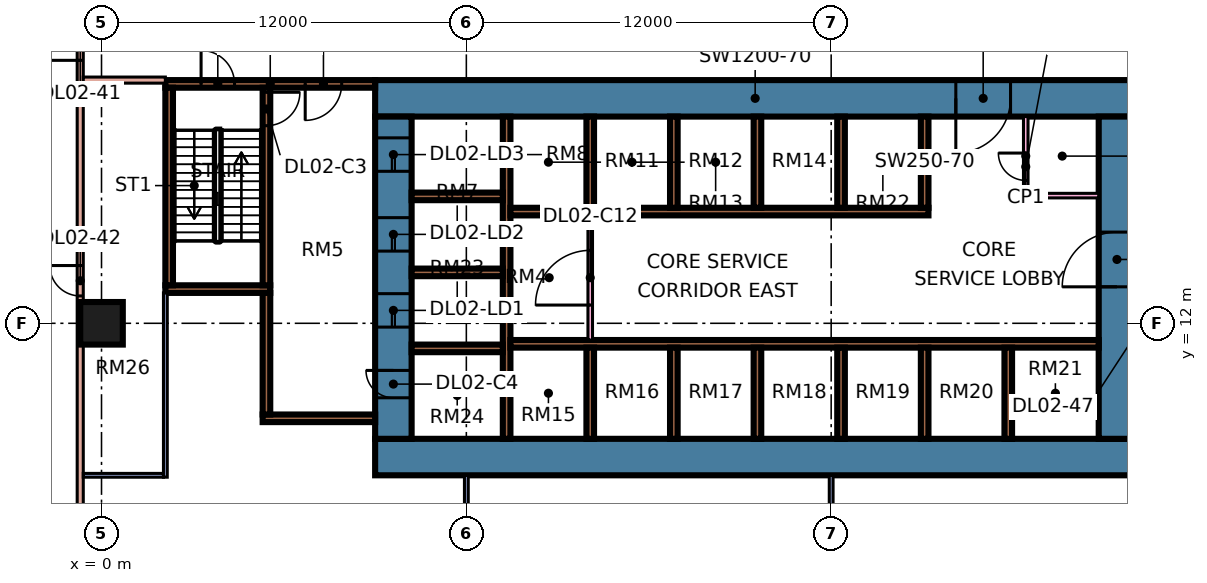
"""IFC4 building model, lengths in metres.
Left out: names, types, materials, properties, quantities, classifications, styles, units other than length and angle.
Written with IfcOpenShell. Run it as: python <this file> out.ifc"""

import sys

from ifc_helpers import new_model, si_unit, direction, frame, frame_2d, origin, origin_2d, place, context, subcontext, project, spatial, rectangle, extrude, element, fill, save


model = new_model("IFC4")
c1 = context("Model", 3, precision=1e-05, world=origin(), true_north=direction((0.0, 1.0)))
c2 = subcontext(c1, "Body", "Model", "MODEL_VIEW")
j1 = project(units=[si_unit("LENGTHUNIT", "METRE"), si_unit("PLANEANGLEUNIT", "RADIAN")], contexts=[c1])
p1 = place(None, origin())
s1 = spatial("IfcSite", under=j1, at=p1, CompositionType="ELEMENT")
p2 = place(p1, origin())
s2 = spatial("IfcBuilding", under=s1, at=p2, CompositionType="ELEMENT")
p3 = place(p2, frame((0.0, 0.0, 12.0)))
s3 = spatial("IfcBuildingStorey", under=s2, at=p3, CompositionType="ELEMENT", Elevation=12.0)
p4 = place(p3, frame((0.0, 12.0, 0.0), z_axis=(0.0, 0.0, 1.0), x_axis=(1.0, 0.0, 0.0)))
e1 = element("IfcColumn", 1, at=p4, inside=s3, PredefinedType="COLUMN", context=c2, shape_type="SweptSolid", body=[
    extrude(rectangle(XDim=1.4, YDim=1.4, at=origin_2d()), origin(), (0.0, 0.0, 1.0), 4.8),
])
p5 = place(p3, frame((9.0, 7.6, 0.0), z_axis=(0.0, 0.0, 1.0), x_axis=(1.0, 0.0, 0.0)))
e2 = element("IfcWall", 2, at=p5, inside=s3, PredefinedType="SHEAR", context=c2, shape_type="SweptSolid", body=[
    extrude(rectangle(XDim=25.0, YDim=1.2, at=frame_2d((12.5, 0.0))), origin(), (0.0, 0.0, 1.0), 4.8),
])
p6 = place(p3, frame((9.0, 19.4, 0.0), z_axis=(0.0, 0.0, 1.0), x_axis=(1.0, 0.0, 0.0)))
e3 = element("IfcWall", 3, at=p6, inside=s3, PredefinedType="SHEAR", context=c2, shape_type="SweptSolid", body=[
    extrude(rectangle(XDim=25.0, YDim=1.2, at=frame_2d((12.5, 0.0))), origin(), (0.0, 0.0, 1.0), 4.8),
])
p7 = place(p6, frame((19.1, 0.0, 0.0)))
e4 = element("IfcOpeningElement", 4, at=p7, cuts=e3, PredefinedType="OPENING", context=c2, shape_type="SweptSolid", body=[
    extrude(rectangle(XDim=1.8, YDim=2.4, at=frame_2d((0.9, 1.2))), frame((0.0, 0.61, 0.0), z_axis=(0.0, -1.0, 0.0), x_axis=(1.0, 0.0, 0.0)), (0.0, 0.0, 1.0), 1.22),
])
p8 = place(p3, frame((9.6, 8.2, 0.0), z_axis=(0.0, 0.0, 1.0), x_axis=(0.0, 1.0, 0.0)))
e5 = element("IfcWall", 5, at=p8, inside=s3, PredefinedType="SHEAR", context=c2, shape_type="SweptSolid", body=[
    extrude(rectangle(XDim=10.6, YDim=1.2, at=frame_2d((5.3, 0.0))), origin(), (0.0, 0.0, 1.0), 4.8),
])
p9 = place(p8, frame((3.675, 0.0, 0.0)))
e6 = element("IfcOpeningElement", 6, at=p9, cuts=e5, PredefinedType="OPENING", context=c2, shape_type="SweptSolid", body=[
    extrude(rectangle(XDim=1.1, YDim=2.2, at=frame_2d((0.55, 1.1))), frame((0.0, 0.61, 0.0), z_axis=(0.0, -1.0, 0.0), x_axis=(1.0, 0.0, 0.0)), (0.0, 0.0, 1.0), 1.22),
])
p10 = place(p8, frame((6.175, 0.0, 0.0)))
e7 = element("IfcOpeningElement", 7, at=p10, cuts=e5, PredefinedType="OPENING", context=c2, shape_type="SweptSolid", body=[
    extrude(rectangle(XDim=1.1, YDim=2.2, at=frame_2d((0.55, 1.1))), frame((0.0, 0.61, 0.0), z_axis=(0.0, -1.0, 0.0), x_axis=(1.0, 0.0, 0.0)), (0.0, 0.0, 1.0), 1.22),
])
p11 = place(p8, frame((8.8, 0.0, 0.0)))
e8 = element("IfcOpeningElement", 8, at=p11, cuts=e5, PredefinedType="OPENING", context=c2, shape_type="SweptSolid", body=[
    extrude(rectangle(XDim=1.1, YDim=2.2, at=frame_2d((0.55, 1.1))), frame((0.0, 0.61, 0.0), z_axis=(0.0, -1.0, 0.0), x_axis=(1.0, 0.0, 0.0)), (0.0, 0.0, 1.0), 1.22),
])
p12 = place(p8, frame((1.35, 0.0, 0.0)))
e9 = element("IfcOpeningElement", 9, at=p12, cuts=e5, PredefinedType="OPENING", context=c2, shape_type="SweptSolid", body=[
    extrude(rectangle(XDim=0.9, YDim=2.1, at=frame_2d((0.45, 1.05))), frame((0.0, 0.61, 0.0), z_axis=(0.0, -1.0, 0.0), x_axis=(1.0, 0.0, 0.0)), (0.0, 0.0, 1.0), 1.22),
])
p13 = place(p3, frame((33.4, 8.2, 0.0), z_axis=(0.0, 0.0, 1.0), x_axis=(0.0, 1.0, 0.0)))
e10 = element("IfcWall", 10, at=p13, inside=s3, PredefinedType="SHEAR", context=c2, shape_type="SweptSolid", body=[
    extrude(rectangle(XDim=10.6, YDim=1.2, at=frame_2d((5.3, 0.0))), origin(), (0.0, 0.0, 1.0), 4.8),
])
p14 = place(p13, frame((5.0, 0.0, 0.0)))
e11 = element("IfcOpeningElement", 11, at=p14, cuts=e10, PredefinedType="OPENING", context=c2, shape_type="SweptSolid", body=[
    extrude(rectangle(XDim=1.8, YDim=2.4, at=frame_2d((0.9, 1.2))), frame((0.0, 0.61, 0.0), z_axis=(0.0, -1.0, 0.0), x_axis=(1.0, 0.0, 0.0)), (0.0, 0.0, 1.0), 1.22),
])
p15 = place(p3, frame((13.325, 8.2, 0.0), z_axis=(0.0, 0.0, 1.0), x_axis=(0.0, 1.0, 0.0)))
e12 = element("IfcWall", 12, at=p15, inside=s3, PredefinedType="SHEAR", context=c2, shape_type="SweptSolid", body=[
    extrude(rectangle(XDim=10.6, YDim=0.25, at=frame_2d((5.3, 0.0))), origin(), (0.0, 0.0, 1.0), 4.8),
])
p16 = place(p3, frame((13.45, 11.325, 0.0), z_axis=(0.0, 0.0, 1.0), x_axis=(1.0, 0.0, 0.0)))
e13 = element("IfcWall", 13, at=p16, inside=s3, PredefinedType="SHEAR", context=c2, shape_type="SweptSolid", body=[
    extrude(rectangle(XDim=19.35, YDim=0.25, at=frame_2d((9.675, 0.0))), origin(), (0.0, 0.0, 1.0), 4.8),
])
p17 = place(p3, frame((13.45, 15.675, 0.0), z_axis=(0.0, 0.0, 1.0), x_axis=(1.0, 0.0, 0.0)))
e14 = element("IfcWall", 14, at=p17, inside=s3, PredefinedType="SHEAR", context=c2, shape_type="SweptSolid", body=[
    extrude(rectangle(XDim=13.75, YDim=0.25, at=frame_2d((6.875, 0.0))), origin(), (0.0, 0.0, 1.0), 4.8),
])
for number, where, z_axis, x_axis in (
    (15, (10.2, 11.175, 0.0), (0.0, 0.0, 1.0), (1.0, 0.0, 0.0)),
    (16, (10.2, 13.675, 0.0), (0.0, 0.0, 1.0), (1.0, 0.0, 0.0)),
    (17, (10.2, 16.175, 0.0), (0.0, 0.0, 1.0), (1.0, 0.0, 0.0)),
    (18, (16.075, 8.2, 0.0), (0.0, 0.0, 1.0), (0.0, 1.0, 0.0)),
    (19, (18.825, 8.2, 0.0), (0.0, 0.0, 1.0), (0.0, 1.0, 0.0)),
    (20, (21.575, 8.2, 0.0), (0.0, 0.0, 1.0), (0.0, 1.0, 0.0)),
    (21, (24.325, 8.2, 0.0), (0.0, 0.0, 1.0), (0.0, 1.0, 0.0)),
    (22, (27.075, 8.2, 0.0), (0.0, 0.0, 1.0), (0.0, 1.0, 0.0)),
    (23, (29.825, 8.2, 0.0), (0.0, 0.0, 1.0), (0.0, 1.0, 0.0)),
    (24, (16.075, 15.8, 0.0), (0.0, 0.0, 1.0), (0.0, 1.0, 0.0)),
    (25, (18.825, 15.8, 0.0), (0.0, 0.0, 1.0), (0.0, 1.0, 0.0)),
    (26, (21.575, 15.8, 0.0), (0.0, 0.0, 1.0), (0.0, 1.0, 0.0)),
    (27, (24.325, 15.8, 0.0), (0.0, 0.0, 1.0), (0.0, 1.0, 0.0)),
    (28, (27.075, 15.8, 0.0), (0.0, 0.0, 1.0), (0.0, 1.0, 0.0)),
):
    element("IfcWall", number, at=place(p3, frame(where, z_axis=z_axis, x_axis=x_axis)), inside=s3, PredefinedType="SHEAR", context=c2, shape_type="SweptSolid", body=[
        extrude(rectangle(XDim=3.0, YDim=0.25, at=frame_2d((1.5, 0.0))), origin(), (0.0, 0.0, 1.0), 4.8),
    ])
p18 = place(p3, frame((2.1, 19.875, 0.0), z_axis=(0.0, 0.0, 1.0), x_axis=(1.0, 0.0, 0.0)))
e29 = element("IfcWall", 29, at=p18, inside=s3, PredefinedType="SHEAR", context=c2, shape_type="SweptSolid", body=[
    extrude(rectangle(XDim=6.9, YDim=0.25, at=frame_2d((3.45, 0.0))), origin(), (0.0, 0.0, 1.0), 4.8),
])
p19 = place(p18, frame((1.175, 0.0, 0.0)))
e30 = element("IfcOpeningElement", 30, at=p19, cuts=e29, PredefinedType="OPENING", context=c2, shape_type="SweptSolid", body=[
    extrude(rectangle(XDim=1.1, YDim=2.2, at=frame_2d((0.55, 1.1))), frame((0.0, 0.135, 0.0), z_axis=(0.0, -1.0, 0.0), x_axis=(1.0, 0.0, 0.0)), (0.0, 0.0, 1.0), 0.27),
])
p20 = place(p18, frame((4.6, 0.0, 0.0)))
e31 = element("IfcOpeningElement", 31, at=p20, cuts=e29, PredefinedType="OPENING", context=c2, shape_type="SweptSolid", body=[
    extrude(rectangle(XDim=1.2, YDim=2.2, at=frame_2d((0.6, 1.1))), frame((0.0, 0.135, 0.0), z_axis=(0.0, -1.0, 0.0), x_axis=(1.0, 0.0, 0.0)), (0.0, 0.0, 1.0), 0.27),
])
p21 = place(p3, frame((2.1, 13.125, 0.0), z_axis=(0.0, 0.0, 1.0), x_axis=(1.0, 0.0, 0.0)))
e32 = element("IfcWall", 32, at=p21, inside=s3, PredefinedType="SHEAR", context=c2, shape_type="SweptSolid", body=[
    extrude(rectangle(XDim=3.45, YDim=0.25, at=frame_2d((1.725, 0.0))), origin(), (0.0, 0.0, 1.0), 4.8),
])
p22 = place(p3, frame((2.225, 13.25, 0.0), z_axis=(0.0, 0.0, 1.0), x_axis=(0.0, 1.0, 0.0)))
e33 = element("IfcWall", 33, at=p22, inside=s3, PredefinedType="SHEAR", context=c2, shape_type="SweptSolid", body=[
    extrude(rectangle(XDim=6.5, YDim=0.25, at=frame_2d((3.25, 0.0))), origin(), (0.0, 0.0, 1.0), 4.8),
])
p23 = place(p3, frame((5.425, 13.25, 0.0), z_axis=(0.0, 0.0, 1.0), x_axis=(0.0, 1.0, 0.0)))
e34 = element("IfcWall", 34, at=p23, inside=s3, PredefinedType="SHEAR", context=c2, shape_type="SweptSolid", body=[
    extrude(rectangle(XDim=6.5, YDim=0.25, at=frame_2d((3.25, 0.0))), origin(), (0.0, 0.0, 1.0), 4.8),
])
p24 = place(p23, frame((5.25, 0.0, 0.0)))
e35 = element("IfcOpeningElement", 35, at=p24, cuts=e34, PredefinedType="OPENING", context=c2, shape_type="SweptSolid", body=[
    extrude(rectangle(XDim=1.1, YDim=2.2, at=frame_2d((0.55, 1.1))), frame((0.0, 0.135, 0.0), z_axis=(0.0, -1.0, 0.0), x_axis=(1.0, 0.0, 0.0)), (0.0, 0.0, 1.0), 0.27),
])
p25 = place(p3, frame((5.3, 8.875, 0.0), z_axis=(0.0, 0.0, 1.0), x_axis=(1.0, 0.0, 0.0)))
e36 = element("IfcWall", 36, at=p25, inside=s3, PredefinedType="SHEAR", context=c2, shape_type="SweptSolid", body=[
    extrude(rectangle(XDim=3.7, YDim=0.25, at=frame_2d((1.85, 0.0))), origin(), (0.0, 0.0, 1.0), 4.8),
])
p26 = place(p3, frame((5.425, 9.0, 0.0), z_axis=(0.0, 0.0, 1.0), x_axis=(0.0, 1.0, 0.0)))
e37 = element("IfcWall", 37, at=p26, inside=s3, PredefinedType="SHEAR", context=c2, shape_type="SweptSolid", body=[
    extrude(rectangle(XDim=4.0, YDim=0.25, at=frame_2d((2.0, 0.0))), origin(), (0.0, 0.0, 1.0), 4.8),
])
p27 = place(p3, frame((8.275, -11.7, 0.0), z_axis=(0.0, 0.0, 1.0), x_axis=(-0.707106781187, 0.707106781187, 0.0)))
e38 = element("IfcWall", 38, at=p27, inside=s3, PredefinedType="PARAPET", context=c2, shape_type="SweptSolid", body=[
    extrude(rectangle(XDim=28.249, YDim=0.2, at=frame_2d((14.125, 0.0))), origin(), (0.0, 0.0, 1.0), 0.5),
])
p28 = place(p3, frame((16.075, 11.45, 0.0), z_axis=(0.0, 0.0, 1.0), x_axis=(0.0, 1.0, 0.0)))
e39 = element("IfcWall", 39, at=p28, inside=s3, PredefinedType="PARTITIONING", context=c2, shape_type="SweptSolid", body=[
    extrude(rectangle(XDim=4.1, YDim=0.15, at=frame_2d((2.05, 0.0))), origin(), (0.0, 0.0, 1.0), 4.4),
])
p29 = place(p28, frame((1.15, 0.0, 0.0)))
e40 = element("IfcOpeningElement", 40, at=p29, cuts=e39, PredefinedType="OPENING", context=c2, shape_type="SweptSolid", body=[
    extrude(rectangle(XDim=1.8, YDim=2.4, at=frame_2d((0.9, 1.2))), frame((0.0, 0.085, 0.0), z_axis=(0.0, -1.0, 0.0), x_axis=(1.0, 0.0, 0.0)), (0.0, 0.0, 1.0), 0.17),
])
p30 = place(p3, frame((30.4, 16.2, 0.0), z_axis=(0.0, 0.0, 1.0), x_axis=(0.0, 1.0, 0.0)))
e41 = element("IfcWall", 41, at=p30, inside=s3, PredefinedType="PARTITIONING", context=c2, shape_type="SweptSolid", body=[
    extrude(rectangle(XDim=2.6, YDim=0.15, at=frame_2d((1.3, 0.0))), origin(), (0.0, 0.0, 1.0), 4.4),
])
p31 = place(p30, frame((0.5, 0.0, 0.0)))
e42 = element("IfcOpeningElement", 42, at=p31, cuts=e41, PredefinedType="OPENING", context=c2, shape_type="SweptSolid", body=[
    extrude(rectangle(XDim=0.9, YDim=2.1, at=frame_2d((0.45, 1.05))), frame((0.0, 0.085, 0.0), z_axis=(0.0, -1.0, 0.0), x_axis=(1.0, 0.0, 0.0)), (0.0, 0.0, 1.0), 0.17),
])
p32 = place(p3, frame((30.4, 16.2, 0.0), z_axis=(0.0, 0.0, 1.0), x_axis=(1.0, 0.0, 0.0)))
e43 = element("IfcWall", 43, at=p32, inside=s3, PredefinedType="PARTITIONING", context=c2, shape_type="SweptSolid", body=[
    extrude(rectangle(XDim=2.4, YDim=0.15, at=frame_2d((1.2, 0.0))), origin(), (0.0, 0.0, 1.0), 4.4),
])
p33 = place(p3, frame((-0.7, 0.7, 0.0), z_axis=(0.0, 0.0, 1.0), x_axis=(0.0, 1.0, 0.0)))
e44 = element("IfcWall", 44, at=p33, inside=s3, PredefinedType="PARTITIONING", context=c2, shape_type="SweptSolid", body=[
    extrude(rectangle(XDim=22.3, YDim=0.2, at=frame_2d((11.15, 0.0))), origin(), (0.0, 0.0, 1.0), 4.4),
])
p34 = place(p33, frame((19.95, 0.0, 0.0)))
e45 = element("IfcOpeningElement", 45, at=p34, cuts=e44, PredefinedType="OPENING", context=c2, shape_type="SweptSolid", body=[
    extrude(rectangle(XDim=1.8, YDim=2.1, at=frame_2d((0.9, 1.05))), frame((0.0, 0.11, 0.0), z_axis=(0.0, -1.0, 0.0), x_axis=(1.0, 0.0, 0.0)), (0.0, 0.0, 1.0), 0.22),
])
p35 = place(p33, frame((12.2, 0.0, 0.0)))
e46 = element("IfcOpeningElement", 46, at=p35, cuts=e44, PredefinedType="OPENING", context=c2, shape_type="SweptSolid", body=[
    extrude(rectangle(XDim=1.0, YDim=2.1, at=frame_2d((0.5, 1.05))), frame((0.0, 0.11, 0.0), z_axis=(0.0, -1.0, 0.0), x_axis=(1.0, 0.0, 0.0)), (0.0, 0.0, 1.0), 0.22),
])
p36 = place(p33, frame((3.0, 0.0, 0.0)))
e47 = element("IfcOpeningElement", 47, at=p36, cuts=e44, PredefinedType="OPENING", context=c2, shape_type="SweptSolid", body=[
    extrude(rectangle(XDim=1.0, YDim=2.1, at=frame_2d((0.5, 1.05))), frame((0.0, 0.11, 0.0), z_axis=(0.0, -1.0, 0.0), x_axis=(1.0, 0.0, 0.0)), (0.0, 0.0, 1.0), 0.22),
])
p37 = place(p3, frame((-0.6, 7.0, 0.0), z_axis=(0.0, 0.0, 1.0), x_axis=(1.0, 0.0, 0.0)))
e48 = element("IfcWall", 48, at=p37, inside=s3, PredefinedType="PARTITIONING", context=c2, shape_type="SweptSolid", body=[
    extrude(rectangle(XDim=2.638, YDim=0.125, at=frame_2d((1.319, 0.0))), origin(), (0.0, 0.0, 1.0), 4.4),
])
p38 = place(p3, frame((-0.6, 20.0, 0.0), z_axis=(0.0, 0.0, 1.0), x_axis=(1.0, 0.0, 0.0)))
e49 = element("IfcWall", 49, at=p38, inside=s3, PredefinedType="PARTITIONING", context=c2, shape_type="SweptSolid", body=[
    extrude(rectangle(XDim=2.7, YDim=0.2, at=frame_2d((1.35, 0.0))), origin(), (0.0, 0.0, 1.0), 4.4),
])
p39 = place(p3, frame((2.1, 6.938, 0.0), z_axis=(0.0, 0.0, 1.0), x_axis=(0.0, 1.0, 0.0)))
e50 = element("IfcWall", 50, at=p39, inside=s3, PredefinedType="PARTITIONING", context=c2, shape_type="SweptSolid", body=[
    extrude(rectangle(XDim=6.062, YDim=0.125, at=frame_2d((3.031, 0.0))), origin(), (0.0, 0.0, 1.0), 4.4),
])
for number, where, z_axis, x_axis in (
    (51, (12.0, -0.6, 0.0), (0.0, 0.0, 1.0), (0.0, 1.0, 0.0)),
    (52, (24.0, -0.6, 0.0), (0.0, 0.0, 1.0), (0.0, 1.0, 0.0)),
):
    element("IfcWall", number, at=place(p3, frame(where, z_axis=z_axis, x_axis=x_axis)), inside=s3, PredefinedType="PARTITIONING", context=c2, shape_type="SweptSolid", body=[
        extrude(rectangle(XDim=7.6, YDim=0.125, at=frame_2d((3.8, 0.0))), origin(), (0.0, 0.0, 1.0), 4.4),
    ])
p40 = place(p9, origin())
e53 = element("IfcDoor", 53, at=p40, inside=s3, OperationType="DOUBLE_DOOR_SLIDING", PredefinedType="DOOR", context=c2, shape_type="SweptSolid", body=[
    extrude(rectangle(XDim=1.1, YDim=2.2, at=frame_2d((0.55, 1.1))), frame((0.0, 0.025, 0.0), z_axis=(0.0, -1.0, 0.0), x_axis=(1.0, 0.0, 0.0)), (0.0, 0.0, 1.0), 0.05),
])
fill(e6, e53)
p41 = place(p10, origin())
e54 = element("IfcDoor", 54, at=p41, inside=s3, OperationType="DOUBLE_DOOR_SLIDING", PredefinedType="DOOR", context=c2, shape_type="SweptSolid", body=[
    extrude(rectangle(XDim=1.1, YDim=2.2, at=frame_2d((0.55, 1.1))), frame((0.0, 0.025, 0.0), z_axis=(0.0, -1.0, 0.0), x_axis=(1.0, 0.0, 0.0)), (0.0, 0.0, 1.0), 0.05),
])
fill(e7, e54)
p42 = place(p11, origin())
e55 = element("IfcDoor", 55, at=p42, inside=s3, OperationType="DOUBLE_DOOR_SLIDING", PredefinedType="DOOR", context=c2, shape_type="SweptSolid", body=[
    extrude(rectangle(XDim=1.1, YDim=2.2, at=frame_2d((0.55, 1.1))), frame((0.0, 0.025, 0.0), z_axis=(0.0, -1.0, 0.0), x_axis=(1.0, 0.0, 0.0)), (0.0, 0.0, 1.0), 0.05),
])
fill(e8, e55)
p43 = place(p14, origin())
e56 = element("IfcDoor", 56, at=p43, inside=s3, OperationType="DOUBLE_DOOR_SINGLE_SWING", PredefinedType="DOOR", context=c2, shape_type="SweptSolid", body=[
    extrude(rectangle(XDim=1.8, YDim=2.4, at=frame_2d((0.9, 1.2))), frame((0.0, 0.025, 0.0), z_axis=(0.0, -1.0, 0.0), x_axis=(1.0, 0.0, 0.0)), (0.0, 0.0, 1.0), 0.05),
])
fill(e11, e56)
p44 = place(p7, frame((1.8, 0.0, 0.0), z_axis=(0.0, 0.0, 1.0), x_axis=(-1.0, 0.0, 0.0)))
e57 = element("IfcDoor", 57, at=p44, inside=s3, OperationType="DOUBLE_DOOR_SINGLE_SWING", PredefinedType="DOOR", context=c2, shape_type="SweptSolid", body=[
    extrude(rectangle(XDim=1.8, YDim=2.4, at=frame_2d((0.9, 1.2))), frame((0.0, 0.025, 0.0), z_axis=(0.0, -1.0, 0.0), x_axis=(1.0, 0.0, 0.0)), (0.0, 0.0, 1.0), 0.05),
])
fill(e4, e57)
p45 = place(p24, origin())
e58 = element("IfcDoor", 58, at=p45, inside=s3, OperationType="SINGLE_SWING_RIGHT", PredefinedType="DOOR", context=c2, shape_type="SweptSolid", body=[
    extrude(rectangle(XDim=1.1, YDim=2.2, at=frame_2d((0.55, 1.1))), frame((0.0, 0.025, 0.0), z_axis=(0.0, -1.0, 0.0), x_axis=(1.0, 0.0, 0.0)), (0.0, 0.0, 1.0), 0.05),
])
fill(e35, e58)
p46 = place(p12, frame((0.9, 0.0, 0.0), z_axis=(0.0, 0.0, 1.0), x_axis=(-1.0, 0.0, 0.0)))
e59 = element("IfcDoor", 59, at=p46, inside=s3, OperationType="SINGLE_SWING_RIGHT", PredefinedType="DOOR", context=c2, shape_type="SweptSolid", body=[
    extrude(rectangle(XDim=0.9, YDim=2.1, at=frame_2d((0.45, 1.05))), frame((0.0, 0.025, 0.0), z_axis=(0.0, -1.0, 0.0), x_axis=(1.0, 0.0, 0.0)), (0.0, 0.0, 1.0), 0.05),
])
fill(e9, e59)
p47 = place(p19, origin())
e60 = element("IfcDoor", 60, at=p47, inside=s3, OperationType="SINGLE_SWING_LEFT", PredefinedType="DOOR", context=c2, shape_type="SweptSolid", body=[
    extrude(rectangle(XDim=1.1, YDim=2.2, at=frame_2d((0.55, 1.1))), frame((0.0, 0.025, 0.0), z_axis=(0.0, -1.0, 0.0), x_axis=(1.0, 0.0, 0.0)), (0.0, 0.0, 1.0), 0.05),
])
fill(e30, e60)
p48 = place(p20, frame((1.2, 0.0, 0.0), z_axis=(0.0, 0.0, 1.0), x_axis=(-1.0, 0.0, 0.0)))
e61 = element("IfcDoor", 61, at=p48, inside=s3, OperationType="SINGLE_SWING_LEFT", PredefinedType="DOOR", context=c2, shape_type="SweptSolid", body=[
    extrude(rectangle(XDim=1.2, YDim=2.2, at=frame_2d((0.6, 1.1))), frame((0.0, 0.025, 0.0), z_axis=(0.0, -1.0, 0.0), x_axis=(1.0, 0.0, 0.0)), (0.0, 0.0, 1.0), 0.05),
])
fill(e31, e61)
p49 = place(p29, origin())
e62 = element("IfcDoor", 62, at=p49, inside=s3, OperationType="DOUBLE_DOOR_SINGLE_SWING", PredefinedType="DOOR", context=c2, shape_type="SweptSolid", body=[
    extrude(rectangle(XDim=1.8, YDim=2.4, at=frame_2d((0.9, 1.2))), frame((0.0, 0.025, 0.0), z_axis=(0.0, -1.0, 0.0), x_axis=(1.0, 0.0, 0.0)), (0.0, 0.0, 1.0), 0.05),
])
fill(e40, e62)
p50 = place(p31, frame((0.9, 0.0, 0.0), z_axis=(0.0, 0.0, 1.0), x_axis=(-1.0, 0.0, 0.0)))
e63 = element("IfcDoor", 63, at=p50, inside=s3, OperationType="SINGLE_SWING_RIGHT", PredefinedType="DOOR", context=c2, shape_type="SweptSolid", body=[
    extrude(rectangle(XDim=0.9, YDim=2.1, at=frame_2d((0.45, 1.05))), frame((0.0, 0.025, 0.0), z_axis=(0.0, -1.0, 0.0), x_axis=(1.0, 0.0, 0.0)), (0.0, 0.0, 1.0), 0.05),
])
fill(e42, e63)
p51 = place(p34, origin())
e64 = element("IfcDoor", 64, at=p51, inside=s3, OperationType="DOUBLE_DOOR_SINGLE_SWING", PredefinedType="DOOR", context=c2, shape_type="SweptSolid", body=[
    extrude(rectangle(XDim=1.8, YDim=2.1, at=frame_2d((0.9, 1.05))), frame((0.0, 0.025, 0.0), z_axis=(0.0, -1.0, 0.0), x_axis=(1.0, 0.0, 0.0)), (0.0, 0.0, 1.0), 0.05),
])
fill(e45, e64)
p52 = place(p35, frame((1.0, 0.0, 0.0), z_axis=(0.0, 0.0, 1.0), x_axis=(-1.0, 0.0, 0.0)))
e65 = element("IfcDoor", 65, at=p52, inside=s3, OperationType="SINGLE_SWING_RIGHT", PredefinedType="DOOR", context=c2, shape_type="SweptSolid", body=[
    extrude(rectangle(XDim=1.0, YDim=2.1, at=frame_2d((0.5, 1.05))), frame((0.0, 0.025, 0.0), z_axis=(0.0, -1.0, 0.0), x_axis=(1.0, 0.0, 0.0)), (0.0, 0.0, 1.0), 0.05),
])
fill(e46, e65)
save(model, sys.argv[1])
